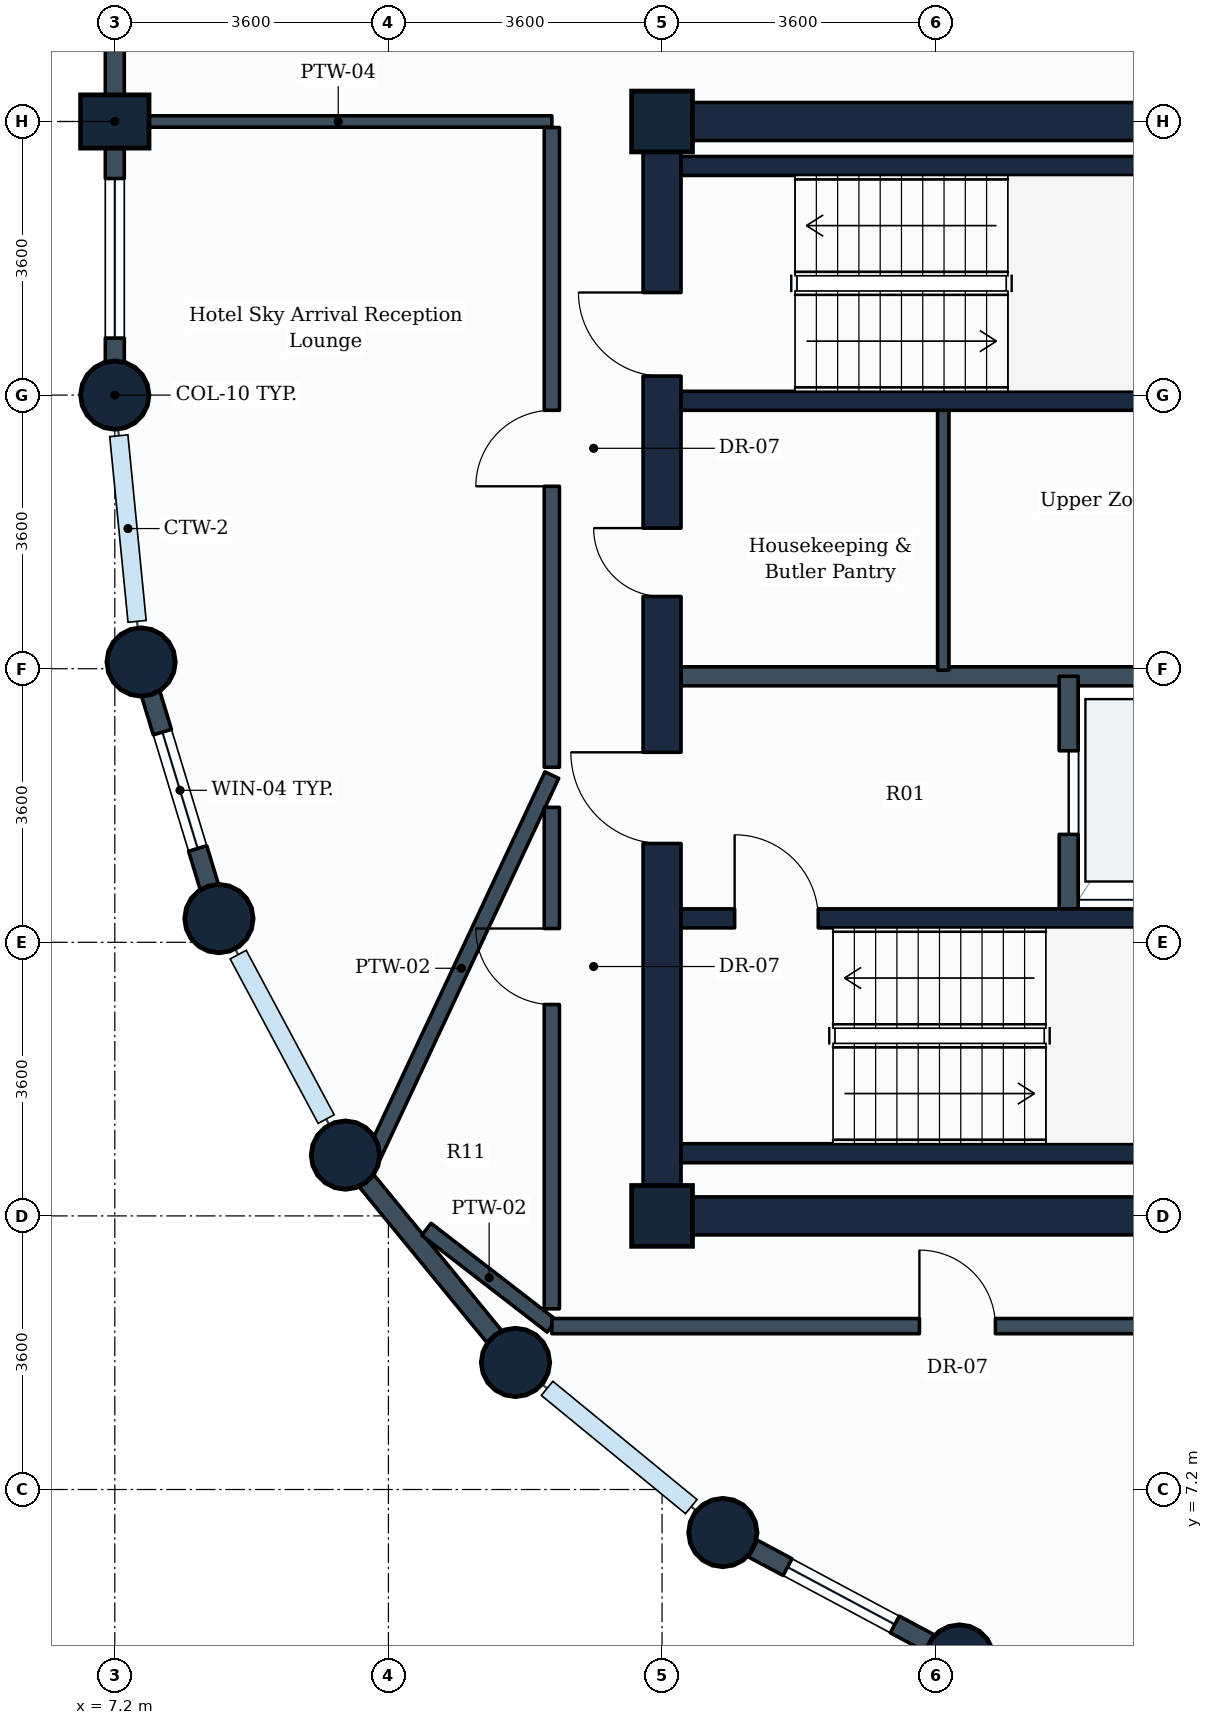
"""IFC4 building model, lengths in metres.
Left out: names, types, materials, properties, quantities, classifications, styles, units other than length and angle.
Written with IfcOpenShell. Run it as: python <this file> out.ifc"""

import sys

from ifc_helpers import new_model, si_unit, direction, frame, frame_2d, origin, origin_2d, place, context, subcontext, project, spatial, rectangle, circle, extrude, element, fill, save


model = new_model("IFC4")
c1 = context("Model", 3, precision=1e-05, world=origin(), true_north=direction((0.0, 1.0)))
c2 = subcontext(c1, "Body", "Model", "MODEL_VIEW")
j1 = project(units=[si_unit("LENGTHUNIT", "METRE"), si_unit("PLANEANGLEUNIT", "RADIAN")], contexts=[c1])
p1 = place(None, origin())
s1 = spatial("IfcSite", under=j1, at=p1, CompositionType="ELEMENT")
p2 = place(p1, origin())
s2 = spatial("IfcBuilding", under=s1, at=p2, CompositionType="ELEMENT")
p3 = place(p2, frame((0.0, 0.0, 217.4)))
s3 = spatial("IfcBuildingStorey", under=s2, at=p3, CompositionType="ELEMENT", Elevation=217.4)
p4 = place(p3, frame((7.2, 21.6, 0.0), z_axis=(0.0, 0.0, 1.0), x_axis=(1.0, 0.0, 0.0)))
e1 = element("IfcColumn", 1, at=p4, inside=s3, PredefinedType="COLUMN", context=c2, shape_type="SweptSolid", body=[
    extrude(circle(Radius=0.45, at=origin_2d()), origin(), (0.0, 0.0, 1.0), 3.6),
])
p5 = place(p3, frame((7.2, 25.2, 0.0), z_axis=(0.0, 0.0, 1.0), x_axis=(0.0, 1.0, 0.0)))
e2 = element("IfcColumn", 2, at=p5, inside=s3, PredefinedType="COLUMN", context=c2, shape_type="SweptSolid", body=[
    extrude(rectangle(XDim=0.7, YDim=0.9, at=origin_2d()), origin(), (0.0, 0.0, 1.0), 3.6),
])
for number, where, z_axis, x_axis in (
    (3, (7.546, 18.088, 0.0), (0.0, 0.0, 1.0), (1.0, 0.0, 0.0)),
    (4, (8.57, 14.712, 0.0), (0.0, 0.0, 1.0), (1.0, 0.0, 0.0)),
    (5, (10.234, 11.6, 0.0), (0.0, 0.0, 1.0), (1.0, 0.0, 0.0)),
    (6, (12.472, 8.872, 0.0), (0.0, 0.0, 1.0), (1.0, 0.0, 0.0)),
):
    element("IfcColumn", number, at=place(p3, frame(where, z_axis=z_axis, x_axis=x_axis)), inside=s3, PredefinedType="COLUMN", context=c2, shape_type="SweptSolid", body=[
        extrude(circle(Radius=0.45, at=origin_2d()), origin(), (0.0, 0.0, 1.0), 3.6),
    ])
for number, where, z_axis, x_axis in (
    (7, (14.4, 10.8, 0.0), (0.0, 0.0, 1.0), (1.0, 0.0, 0.0)),
    (8, (14.4, 25.2, 0.0), (0.0, 0.0, 1.0), (1.0, 0.0, 0.0)),
):
    element("IfcColumn", number, at=place(p3, frame(where, z_axis=z_axis, x_axis=x_axis)), inside=s3, PredefinedType="COLUMN", context=c2, shape_type="SweptSolid", body=[
        extrude(rectangle(XDim=0.8, YDim=0.8, at=origin_2d()), origin(), (0.0, 0.0, 1.0), 3.6),
    ])
for number, where, z_axis, x_axis in (
    (9, (15.2, 6.634, 0.0), (0.0, 0.0, 1.0), (1.0, 0.0, 0.0)),
    (10, (18.312, 4.97, 0.0), (0.0, 0.0, 1.0), (1.0, 0.0, 0.0)),
):
    element("IfcColumn", number, at=place(p3, frame(where, z_axis=z_axis, x_axis=x_axis)), inside=s3, PredefinedType="COLUMN", context=c2, shape_type="SweptSolid", body=[
        extrude(circle(Radius=0.45, at=origin_2d()), origin(), (0.0, 0.0, 1.0), 3.6),
    ])
p6 = place(p3, frame((7.2, 25.2, 0.0), z_axis=(0.0, 0.0, 1.0), x_axis=(0.0, 1.0, 0.0)))
e11 = element("IfcWall", 11, at=p6, inside=s3, PredefinedType="STANDARD", context=c2, shape_type="SweptSolid", body=[
    extrude(rectangle(XDim=3.6, YDim=0.25, at=frame_2d((1.8, 0.0))), origin(), (0.0, 0.0, 1.0), 2.83),
])
p7 = place(p3, frame((7.2, 21.6, 0.0), z_axis=(0.0, 0.0, 1.0), x_axis=(0.0, 1.0, 0.0)))
e12 = element("IfcWall", 12, at=p7, inside=s3, PredefinedType="STANDARD", context=c2, shape_type="SweptSolid", body=[
    extrude(rectangle(XDim=3.6, YDim=0.25, at=frame_2d((1.8, 0.0))), origin(), (0.0, 0.0, 1.0), 2.83),
])
p8 = place(p7, frame((0.75, 0.0, 0.85)))
e13 = element("IfcOpeningElement", 13, at=p8, cuts=e12, PredefinedType="OPENING", context=c2, shape_type="SweptSolid", body=[
    extrude(rectangle(XDim=2.1, YDim=1.35, at=frame_2d((1.05, 0.675))), frame((0.0, 0.135, 0.0), z_axis=(0.0, -1.0, 0.0), x_axis=(1.0, 0.0, 0.0)), (0.0, 0.0, 1.0), 0.27),
])
p9 = place(p3, frame((8.57, 14.712, 0.0), z_axis=(0.0, 0.0, 1.0), x_axis=(-0.290305086481, 0.956934144423, 0.0)))
e14 = element("IfcWall", 14, at=p9, inside=s3, PredefinedType="STANDARD", context=c2, shape_type="SweptSolid", body=[
    extrude(rectangle(XDim=3.528, YDim=0.25, at=frame_2d((1.764, 0.0))), origin(), (0.0, 0.0, 1.0), 2.83),
])
p10 = place(p9, frame((0.964, 0.0, 0.85)))
e15 = element("IfcOpeningElement", 15, at=p10, cuts=e14, PredefinedType="OPENING", context=c2, shape_type="SweptSolid", body=[
    extrude(rectangle(XDim=1.6, YDim=1.35, at=frame_2d((0.8, 0.675))), frame((0.0, 0.135, 0.0), z_axis=(0.0, -1.0, 0.0), x_axis=(1.0, 0.0, 0.0)), (0.0, 0.0, 1.0), 0.27),
])
p11 = place(p3, frame((12.472, 8.872, 0.0), z_axis=(0.0, 0.0, 1.0), x_axis=(-0.634258295121, 0.773121216285, 0.0)))
e16 = element("IfcWall", 16, at=p11, inside=s3, PredefinedType="STANDARD", context=c2, shape_type="SweptSolid", body=[
    extrude(rectangle(XDim=3.529, YDim=0.25, at=frame_2d((1.764, 0.0))), origin(), (0.0, 0.0, 1.0), 2.83),
])
p12 = place(p3, frame((18.312, 4.97, 0.0), z_axis=(0.0, 0.0, 1.0), x_axis=(-0.881846862014, 0.471535907389, 0.0)))
e17 = element("IfcWall", 17, at=p12, inside=s3, PredefinedType="STANDARD", context=c2, shape_type="SweptSolid", body=[
    extrude(rectangle(XDim=3.529, YDim=0.25, at=frame_2d((1.765, 0.0))), origin(), (0.0, 0.0, 1.0), 2.83),
])
p13 = place(p12, frame((0.964, 0.0, 0.85)))
e18 = element("IfcOpeningElement", 18, at=p13, cuts=e17, PredefinedType="OPENING", context=c2, shape_type="SweptSolid", body=[
    extrude(rectangle(XDim=1.6, YDim=1.35, at=frame_2d((0.8, 0.675))), frame((0.0, 0.135, 0.0), z_axis=(0.0, -1.0, 0.0), x_axis=(1.0, 0.0, 0.0)), (0.0, 0.0, 1.0), 0.27),
])
p14 = place(p3, frame((14.4, 10.8, 0.0), z_axis=(0.0, 0.0, 1.0), x_axis=(1.0, 0.0, 0.0)))
e19 = element("IfcWall", 19, at=p14, inside=s3, PredefinedType="SHEAR", context=c2, shape_type="SweptSolid", body=[
    extrude(rectangle(XDim=18.0, YDim=0.5, at=frame_2d((9.0, 0.0))), origin(), (0.0, 0.0, 1.0), 3.28),
])
p15 = place(p3, frame((14.4, 25.2, 0.0), z_axis=(0.0, 0.0, 1.0), x_axis=(1.0, 0.0, 0.0)))
e20 = element("IfcWall", 20, at=p15, inside=s3, PredefinedType="SHEAR", context=c2, shape_type="SweptSolid", body=[
    extrude(rectangle(XDim=10.8, YDim=0.5, at=frame_2d((5.4, 0.0))), origin(), (0.0, 0.0, 1.0), 3.28),
])
p16 = place(p3, frame((14.4, 10.8, 0.0), z_axis=(0.0, 0.0, 1.0), x_axis=(0.0, 1.0, 0.0)))
e21 = element("IfcWall", 21, at=p16, inside=s3, PredefinedType="SHEAR", context=c2, shape_type="SweptSolid", body=[
    extrude(rectangle(XDim=14.4, YDim=0.5, at=frame_2d((7.2, 0.0))), origin(), (0.0, 0.0, 1.0), 3.28),
])
p17 = place(p16, frame((11.05, 0.0, 0.0)))
e22 = element("IfcOpeningElement", 22, at=p17, cuts=e21, PredefinedType="OPENING", context=c2, shape_type="SweptSolid", body=[
    extrude(rectangle(XDim=1.1, YDim=2.1, at=frame_2d((0.55, 1.05))), frame((0.0, 0.26, 0.0), z_axis=(0.0, -1.0, 0.0), x_axis=(1.0, 0.0, 0.0)), (0.0, 0.0, 1.0), 0.52),
])
p18 = place(p16, frame((4.9, 0.0, 0.0)))
e23 = element("IfcOpeningElement", 23, at=p18, cuts=e21, PredefinedType="OPENING", context=c2, shape_type="SweptSolid", body=[
    extrude(rectangle(XDim=1.2, YDim=2.1, at=frame_2d((0.6, 1.05))), frame((0.0, 0.26, 0.0), z_axis=(0.0, -1.0, 0.0), x_axis=(1.0, 0.0, 0.0)), (0.0, 0.0, 1.0), 0.52),
])
p19 = place(p16, frame((8.15, 0.0, 0.0)))
e24 = element("IfcOpeningElement", 24, at=p19, cuts=e21, PredefinedType="OPENING", context=c2, shape_type="SweptSolid", body=[
    extrude(rectangle(XDim=0.9, YDim=2.1, at=frame_2d((0.45, 1.05))), frame((0.0, 0.26, 0.0), z_axis=(0.0, -1.0, 0.0), x_axis=(1.0, 0.0, 0.0)), (0.0, 0.0, 1.0), 0.52),
])
p20 = place(p3, frame((14.65, 11.625, 0.0), z_axis=(0.0, 0.0, 1.0), x_axis=(1.0, 0.0, 0.0)))
e25 = element("IfcWall", 25, at=p20, inside=s3, PredefinedType="SHEAR", context=c2, shape_type="SweptSolid", body=[
    extrude(rectangle(XDim=8.7, YDim=0.25, at=frame_2d((4.35, 0.0))), origin(), (0.0, 0.0, 1.0), 3.28),
])
p21 = place(p3, frame((14.65, 14.715, 0.0), z_axis=(0.0, 0.0, 1.0), x_axis=(1.0, 0.0, 0.0)))
e26 = element("IfcWall", 26, at=p21, inside=s3, PredefinedType="SHEAR", context=c2, shape_type="SweptSolid", body=[
    extrude(rectangle(XDim=8.7, YDim=0.25, at=frame_2d((4.35, 0.0))), origin(), (0.0, 0.0, 1.0), 3.28),
])
p22 = place(p21, frame((0.705, 0.0, 0.0)))
e27 = element("IfcOpeningElement", 27, at=p22, cuts=e26, PredefinedType="OPENING", context=c2, shape_type="SweptSolid", body=[
    extrude(rectangle(XDim=1.1, YDim=2.1, at=frame_2d((0.55, 1.05))), frame((0.0, 0.135, 0.0), z_axis=(0.0, -1.0, 0.0), x_axis=(1.0, 0.0, 0.0)), (0.0, 0.0, 1.0), 0.27),
])
for number, where, z_axis, x_axis in (
    (28, (14.65, 21.525, 0.0), (0.0, 0.0, 1.0), (1.0, 0.0, 0.0)),
    (29, (14.65, 24.615, 0.0), (0.0, 0.0, 1.0), (1.0, 0.0, 0.0)),
):
    element("IfcWall", number, at=place(p3, frame(where, z_axis=z_axis, x_axis=x_axis)), inside=s3, PredefinedType="SHEAR", context=c2, shape_type="SweptSolid", body=[
        extrude(rectangle(XDim=8.25, YDim=0.25, at=frame_2d((4.125, 0.0))), origin(), (0.0, 0.0, 1.0), 3.28),
    ])
p23 = place(p3, frame((14.65, 17.9, 0.0), z_axis=(0.0, 0.0, 1.0), x_axis=(1.0, 0.0, 0.0)))
e30 = element("IfcWall", 30, at=p23, inside=s3, PredefinedType="PARTITIONING", context=c2, shape_type="SweptSolid", body=[
    extrude(rectangle(XDim=7.15, YDim=0.25, at=frame_2d((3.575, 0.0))), origin(), (0.0, 0.0, 1.0), 3.265),
])
p24 = place(p3, frame((19.75, 14.84, 0.0), z_axis=(0.0, 0.0, 1.0), x_axis=(0.0, 1.0, 0.0)))
e31 = element("IfcWall", 31, at=p24, inside=s3, PredefinedType="PARTITIONING", context=c2, shape_type="SweptSolid", body=[
    extrude(rectangle(XDim=3.06, YDim=0.25, at=frame_2d((1.53, 0.0))), origin(), (0.0, 0.0, 1.0), 3.265),
])
p25 = place(p24, frame((0.98, 0.0, 0.0)))
e32 = element("IfcOpeningElement", 32, at=p25, cuts=e31, PredefinedType="OPENING", context=c2, shape_type="SweptSolid", body=[
    extrude(rectangle(XDim=1.1, YDim=2.1, at=frame_2d((0.55, 1.05))), frame((0.0, 0.135, 0.0), z_axis=(0.0, -1.0, 0.0), x_axis=(1.0, 0.0, 0.0)), (0.0, 0.0, 1.0), 0.27),
])
p26 = place(p3, frame((18.1, 17.98, 0.0), z_axis=(0.0, 0.0, 1.0), x_axis=(0.0, 1.0, 0.0)))
e33 = element("IfcWall", 33, at=p26, inside=s3, PredefinedType="PARTITIONING", context=c2, shape_type="SweptSolid", body=[
    extrude(rectangle(XDim=3.42, YDim=0.15, at=frame_2d((1.71, 0.0))), origin(), (0.0, 0.0, 1.0), 3.265),
])
p27 = place(p3, frame((7.329, 25.2, 0.0), z_axis=(0.0, 0.0, 1.0), x_axis=(1.0, 0.0, 0.0)))
e34 = element("IfcWall", 34, at=p27, inside=s3, PredefinedType="PARTITIONING", context=c2, shape_type="SweptSolid", body=[
    extrude(rectangle(XDim=5.621, YDim=0.15, at=frame_2d((2.811, 0.0))), origin(), (0.0, 0.0, 1.0), 3.265),
])
p28 = place(p3, frame((12.95, 9.35, 0.0), z_axis=(0.0, 0.0, 1.0), x_axis=(-0.791573423038, 0.611074067474, 0.0)))
e35 = element("IfcWall", 35, at=p28, inside=s3, PredefinedType="PARTITIONING", context=c2, shape_type="SweptSolid", body=[
    extrude(rectangle(XDim=2.084, YDim=0.2, at=frame_2d((1.042, 0.0))), origin(), (0.0, 0.0, 1.0), 2.83),
])
p29 = place(p3, frame((12.95, 16.6, 0.0), z_axis=(0.0, 0.0, 1.0), x_axis=(-0.424351425714, -0.90549758006, 0.0)))
e36 = element("IfcWall", 36, at=p29, inside=s3, PredefinedType="PARTITIONING", context=c2, shape_type="SweptSolid", body=[
    extrude(rectangle(XDim=5.614, YDim=0.2, at=frame_2d((2.807, 0.0))), origin(), (0.0, 0.0, 1.0), 2.83),
])
p30 = place(p3, frame((12.95, 16.704, 0.0), z_axis=(0.0, 0.0, 1.0), x_axis=(0.0, 1.0, 0.0)))
e37 = element("IfcWall", 37, at=p30, inside=s3, PredefinedType="PARTITIONING", context=c2, shape_type="SweptSolid", body=[
    extrude(rectangle(XDim=8.417, YDim=0.2, at=frame_2d((4.208, 0.0))), origin(), (0.0, 0.0, 1.0), 2.99),
])
p31 = place(p30, frame((3.696, 0.0, 0.0)))
e38 = element("IfcOpeningElement", 38, at=p31, cuts=e37, PredefinedType="OPENING", context=c2, shape_type="SweptSolid", body=[
    extrude(rectangle(XDim=1.0, YDim=2.1, at=frame_2d((0.5, 1.05))), frame((0.0, 0.11, 0.0), z_axis=(0.0, -1.0, 0.0), x_axis=(1.0, 0.0, 0.0)), (0.0, 0.0, 1.0), 0.22),
])
p32 = place(p3, frame((12.95, 9.577, 0.0), z_axis=(0.0, 0.0, 1.0), x_axis=(0.0, 1.0, 0.0)))
e39 = element("IfcWall", 39, at=p32, inside=s3, PredefinedType="PARTITIONING", context=c2, shape_type="SweptSolid", body=[
    extrude(rectangle(XDim=6.598, YDim=0.2, at=frame_2d((3.299, 0.0))), origin(), (0.0, 0.0, 1.0), 2.95),
])
p33 = place(p32, frame((4.004, 0.0, 0.0)))
e40 = element("IfcOpeningElement", 40, at=p33, cuts=e39, PredefinedType="OPENING", context=c2, shape_type="SweptSolid", body=[
    extrude(rectangle(XDim=1.0, YDim=2.1, at=frame_2d((0.5, 1.05))), frame((0.0, 0.11, 0.0), z_axis=(0.0, -1.0, 0.0), x_axis=(1.0, 0.0, 0.0)), (0.0, 0.0, 1.0), 0.22),
])
p34 = place(p3, frame((12.95, 9.35, 0.0), z_axis=(0.0, 0.0, 1.0), x_axis=(1.0, 0.0, 0.0)))
e41 = element("IfcWall", 41, at=p34, inside=s3, PredefinedType="PARTITIONING", context=c2, shape_type="SweptSolid", body=[
    extrude(rectangle(XDim=15.771, YDim=0.2, at=frame_2d((7.885, 0.0))), origin(), (0.0, 0.0, 1.0), 2.95),
])
p35 = place(p34, frame((4.836, 0.0, 0.0)))
e42 = element("IfcOpeningElement", 42, at=p35, cuts=e41, PredefinedType="OPENING", context=c2, shape_type="SweptSolid", body=[
    extrude(rectangle(XDim=1.0, YDim=2.1, at=frame_2d((0.5, 1.05))), frame((0.0, 0.11, 0.0), z_axis=(0.0, -1.0, 0.0), x_axis=(1.0, 0.0, 0.0)), (0.0, 0.0, 1.0), 0.22),
])
p36 = place(p8, origin())
e43 = element("IfcWindow", 43, at=p36, inside=s3, PartitioningType="SINGLE_PANEL", PredefinedType="WINDOW", context=c2, shape_type="SweptSolid", body=[
    extrude(rectangle(XDim=2.1, YDim=1.35, at=frame_2d((1.05, 0.675))), frame((0.0, 0.03, 0.0), z_axis=(0.0, -1.0, 0.0), x_axis=(1.0, 0.0, 0.0)), (0.0, 0.0, 1.0), 0.06),
])
fill(e13, e43)
p37 = place(p10, origin())
e44 = element("IfcWindow", 44, at=p37, inside=s3, PartitioningType="SINGLE_PANEL", PredefinedType="WINDOW", context=c2, shape_type="SweptSolid", body=[
    extrude(rectangle(XDim=1.6, YDim=1.35, at=frame_2d((0.8, 0.675))), frame((0.0, 0.03, 0.0), z_axis=(0.0, -1.0, 0.0), x_axis=(1.0, 0.0, 0.0)), (0.0, 0.0, 1.0), 0.06),
])
fill(e15, e44)
p38 = place(p13, origin())
e45 = element("IfcWindow", 45, at=p38, inside=s3, PartitioningType="SINGLE_PANEL", PredefinedType="WINDOW", context=c2, shape_type="SweptSolid", body=[
    extrude(rectangle(XDim=1.6, YDim=1.35, at=frame_2d((0.8, 0.675))), frame((0.0, 0.03, 0.0), z_axis=(0.0, -1.0, 0.0), x_axis=(1.0, 0.0, 0.0)), (0.0, 0.0, 1.0), 0.06),
])
fill(e18, e45)
p39 = place(p22, origin())
e46 = element("IfcDoor", 46, at=p39, inside=s3, OperationType="SINGLE_SWING_LEFT", PredefinedType="DOOR", context=c2, shape_type="SweptSolid", body=[
    extrude(rectangle(XDim=1.1, YDim=2.1, at=frame_2d((0.55, 1.05))), frame((0.0, 0.025, 0.0), z_axis=(0.0, -1.0, 0.0), x_axis=(1.0, 0.0, 0.0)), (0.0, 0.0, 1.0), 0.05),
])
fill(e27, e46)
p40 = place(p17, origin())
e47 = element("IfcDoor", 47, at=p40, inside=s3, OperationType="SINGLE_SWING_RIGHT", PredefinedType="DOOR", context=c2, shape_type="SweptSolid", body=[
    extrude(rectangle(XDim=1.1, YDim=2.1, at=frame_2d((0.55, 1.05))), frame((0.0, 0.025, 0.0), z_axis=(0.0, -1.0, 0.0), x_axis=(1.0, 0.0, 0.0)), (0.0, 0.0, 1.0), 0.05),
])
fill(e22, e47)
p41 = place(p25, origin())
e48 = element("IfcDoor", 48, at=p41, inside=s3, OperationType="SLIDING_TO_LEFT", PredefinedType="DOOR", context=c2, shape_type="SweptSolid", body=[
    extrude(rectangle(XDim=1.1, YDim=2.1, at=frame_2d((0.55, 1.05))), frame((0.0, 0.025, 0.0), z_axis=(0.0, -1.0, 0.0), x_axis=(1.0, 0.0, 0.0)), (0.0, 0.0, 1.0), 0.05),
])
fill(e32, e48)
p42 = place(p18, origin())
e49 = element("IfcDoor", 49, at=p42, inside=s3, OperationType="SINGLE_SWING_RIGHT", PredefinedType="DOOR", context=c2, shape_type="SweptSolid", body=[
    extrude(rectangle(XDim=1.2, YDim=2.1, at=frame_2d((0.6, 1.05))), frame((0.0, 0.025, 0.0), z_axis=(0.0, -1.0, 0.0), x_axis=(1.0, 0.0, 0.0)), (0.0, 0.0, 1.0), 0.05),
])
fill(e23, e49)
p43 = place(p19, origin())
e50 = element("IfcDoor", 50, at=p43, inside=s3, OperationType="SINGLE_SWING_RIGHT", PredefinedType="DOOR", context=c2, shape_type="SweptSolid", body=[
    extrude(rectangle(XDim=0.9, YDim=2.1, at=frame_2d((0.45, 1.05))), frame((0.0, 0.025, 0.0), z_axis=(0.0, -1.0, 0.0), x_axis=(1.0, 0.0, 0.0)), (0.0, 0.0, 1.0), 0.05),
])
fill(e24, e50)
p44 = place(p31, origin())
e51 = element("IfcDoor", 51, at=p44, inside=s3, OperationType="SINGLE_SWING_LEFT", PredefinedType="DOOR", context=c2, shape_type="SweptSolid", body=[
    extrude(rectangle(XDim=1.0, YDim=2.1, at=frame_2d((0.5, 1.05))), frame((0.0, 0.025, 0.0), z_axis=(0.0, -1.0, 0.0), x_axis=(1.0, 0.0, 0.0)), (0.0, 0.0, 1.0), 0.05),
])
fill(e38, e51)
p45 = place(p33, origin())
e52 = element("IfcDoor", 52, at=p45, inside=s3, OperationType="SINGLE_SWING_RIGHT", PredefinedType="DOOR", context=c2, shape_type="SweptSolid", body=[
    extrude(rectangle(XDim=1.0, YDim=2.1, at=frame_2d((0.5, 1.05))), frame((0.0, 0.025, 0.0), z_axis=(0.0, -1.0, 0.0), x_axis=(1.0, 0.0, 0.0)), (0.0, 0.0, 1.0), 0.05),
])
fill(e40, e52)
p46 = place(p35, origin())
e53 = element("IfcDoor", 53, at=p46, inside=s3, OperationType="SINGLE_SWING_LEFT", PredefinedType="DOOR", context=c2, shape_type="SweptSolid", body=[
    extrude(rectangle(XDim=1.0, YDim=2.1, at=frame_2d((0.5, 1.05))), frame((0.0, 0.025, 0.0), z_axis=(0.0, -1.0, 0.0), x_axis=(1.0, 0.0, 0.0)), (0.0, 0.0, 1.0), 0.05),
])
fill(e42, e53)
save(model, sys.argv[1])
